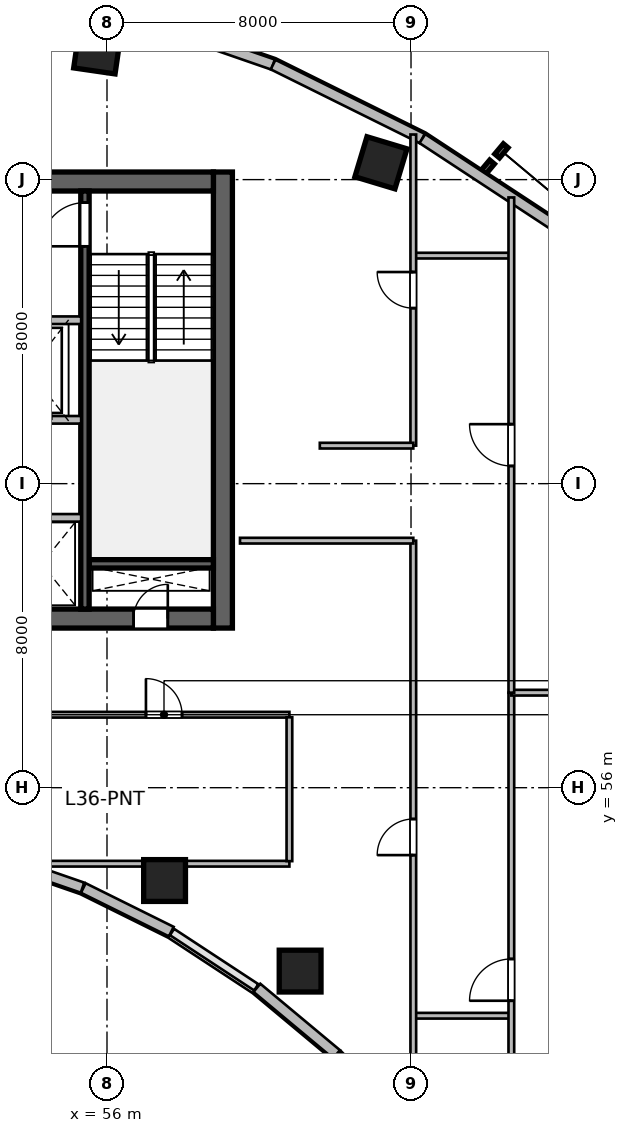
"""IFC4 building model, lengths in metres.
Left out: names, types, materials, properties, quantities, classifications, styles, units other than length and angle.
Written with IfcOpenShell. Run it as: python <this file> out.ifc"""

import sys

from ifc_helpers import new_model, si_unit, direction, frame, frame_2d, origin, origin_2d, place, context, subcontext, project, spatial, rectangle, circle, extrude, source, transform, mapped, element, fill, save


model = new_model("IFC4")
c1 = context("Model", 3, precision=1e-05, world=origin(), true_north=direction((0.0, 1.0)))
c2 = subcontext(c1, "Body", "Model", "MODEL_VIEW")
j1 = project(units=[si_unit("LENGTHUNIT", "METRE"), si_unit("PLANEANGLEUNIT", "RADIAN")], contexts=[c1])
p1 = place(None, origin())
s1 = spatial("IfcSite", under=j1, at=p1, CompositionType="ELEMENT")
p2 = place(p1, origin())
s2 = spatial("IfcBuilding", under=s1, at=p2, CompositionType="ELEMENT")
p3 = place(p2, frame((0.0, 0.0, 150.6)))
s3 = spatial("IfcBuildingStorey", under=s2, at=p3, CompositionType="ELEMENT", Elevation=150.6)
m1 = source(origin(), c2, "Body", "SweptSolid", [
    extrude(rectangle(XDim=12.0, YDim=0.5, at=frame_2d((6.0, 0.0))), origin(), (0.0, 0.0, 1.0), 3.9),
])
p4 = place(p3, frame((59.05, 60.2, 0.0), z_axis=(0.0, 0.0, 1.0), x_axis=(0.0, 1.0, 0.0)))
e1 = element("IfcWall", 1, at=p4, inside=s3, PredefinedType="SHEAR", context=c2, shape_type="MappedRepresentation", body=[
    mapped(m1, transform((0.0, 0.0, 0.0), scale=1.0)),
])
m2 = source(origin(), c2, "Body", "SweptSolid", [
    extrude(rectangle(XDim=21.6, YDim=0.5, at=frame_2d((10.8, 0.0))), origin(), (0.0, 0.0, 1.0), 3.9),
])
p5 = place(p3, frame((37.2, 60.45, 0.0), z_axis=(0.0, 0.0, 1.0), x_axis=(1.0, 0.0, 0.0)))
e2 = element("IfcWall", 2, at=p5, inside=s3, PredefinedType="SHEAR", context=c2, shape_type="MappedRepresentation", body=[
    mapped(m2, transform((0.0, 0.0, 0.0), scale=1.0)),
])
p6 = place(p5, frame((1.1, 0.0, 0.0)))
e3 = element("IfcOpeningElement", 3, at=p6, cuts=e2, PredefinedType="OPENING", context=c2, shape_type="SweptSolid", body=[
    extrude(rectangle(XDim=1.15, YDim=2.15, at=frame_2d((0.575, 1.075))), frame((0.0, 0.26, 0.0), z_axis=(0.0, -1.0, 0.0), x_axis=(1.0, 0.0, 0.0)), (0.0, 0.0, 1.0), 0.52),
])
p7 = place(p5, frame((19.5, 0.0, 0.0)))
e4 = element("IfcOpeningElement", 4, at=p7, cuts=e2, PredefinedType="OPENING", context=c2, shape_type="SweptSolid", body=[
    extrude(rectangle(XDim=0.9, YDim=2.1, at=frame_2d((0.45, 1.05))), frame((0.0, 0.26, 0.0), z_axis=(0.0, -1.0, 0.0), x_axis=(1.0, 0.0, 0.0)), (0.0, 0.0, 1.0), 0.52),
])
p8 = place(p5, frame((12.02, 0.0, 0.0)))
e5 = element("IfcOpeningElement", 5, at=p8, cuts=e2, PredefinedType="OPENING", context=c2, shape_type="SweptSolid", body=[
    extrude(rectangle(XDim=1.6, YDim=2.15, at=frame_2d((0.8, 1.075))), frame((0.0, 0.26, 0.0), z_axis=(0.0, -1.0, 0.0), x_axis=(1.0, 0.0, 0.0)), (0.0, 0.0, 1.0), 0.52),
])
p9 = place(p3, frame((37.2, 71.95, 0.0), z_axis=(0.0, 0.0, 1.0), x_axis=(1.0, 0.0, 0.0)))
e6 = element("IfcWall", 6, at=p9, inside=s3, PredefinedType="SHEAR", context=c2, shape_type="MappedRepresentation", body=[
    mapped(m2, transform((0.0, 0.0, 0.0), scale=1.0)),
])
p10 = place(p9, frame((1.2, 0.0, 0.0)))
e7 = element("IfcOpeningElement", 7, at=p10, cuts=e6, PredefinedType="OPENING", context=c2, shape_type="SweptSolid", body=[
    extrude(rectangle(XDim=0.9, YDim=2.1, at=frame_2d((0.45, 1.05))), frame((0.0, 0.26, 0.0), z_axis=(0.0, -1.0, 0.0), x_axis=(1.0, 0.0, 0.0)), (0.0, 0.0, 1.0), 0.52),
])
p11 = place(p9, frame((14.7, 0.0, 0.0)))
e8 = element("IfcOpeningElement", 8, at=p11, cuts=e6, PredefinedType="OPENING", context=c2, shape_type="SweptSolid", body=[
    extrude(rectangle(XDim=1.2, YDim=2.15, at=frame_2d((0.6, 1.075))), frame((0.0, 0.26, 0.0), z_axis=(0.0, -1.0, 0.0), x_axis=(1.0, 0.0, 0.0)), (0.0, 0.0, 1.0), 0.52),
])
p12 = place(p9, frame((4.15, 0.0, 0.0)))
e9 = element("IfcOpeningElement", 9, at=p12, cuts=e6, PredefinedType="OPENING", context=c2, shape_type="SweptSolid", body=[
    extrude(rectangle(XDim=1.3, YDim=2.15, at=frame_2d((0.65, 1.075))), frame((0.0, 0.26, 0.0), z_axis=(0.0, -1.0, 0.0), x_axis=(1.0, 0.0, 0.0)), (0.0, 0.0, 1.0), 0.52),
])
p13 = place(p9, frame((7.25, 0.0, 0.0)))
e10 = element("IfcOpeningElement", 10, at=p13, cuts=e6, PredefinedType="OPENING", context=c2, shape_type="SweptSolid", body=[
    extrude(rectangle(XDim=0.9, YDim=2.1, at=frame_2d((0.45, 1.05))), frame((0.0, 0.26, 0.0), z_axis=(0.0, -1.0, 0.0), x_axis=(1.0, 0.0, 0.0)), (0.0, 0.0, 1.0), 0.52),
])
m3 = source(origin(), c2, "Body", "SweptSolid", [
    extrude(rectangle(XDim=3.27, YDim=0.22, at=frame_2d((1.635, 0.0))), origin(), (0.0, 0.0, 1.0), 3.9),
])
p14 = place(p3, frame((55.53, 61.89, 0.0), z_axis=(0.0, 0.0, 1.0), x_axis=(1.0, 0.0, 0.0)))
e11 = element("IfcWall", 11, at=p14, inside=s3, PredefinedType="SHEAR", context=c2, shape_type="MappedRepresentation", body=[
    mapped(m3, transform((0.0, 0.0, 0.0), scale=1.0)),
])
m4 = source(origin(), c2, "Body", "SweptSolid", [
    extrude(rectangle(XDim=11.0, YDim=0.22, at=frame_2d((5.5, 0.0))), origin(), (0.0, 0.0, 1.0), 3.9),
])
p15 = place(p3, frame((55.42, 60.7, 0.0), z_axis=(0.0, 0.0, 1.0), x_axis=(0.0, 1.0, 0.0)))
e12 = element("IfcWall", 12, at=p15, inside=s3, PredefinedType="SHEAR", context=c2, shape_type="MappedRepresentation", body=[
    mapped(m4, transform((0.0, 0.0, 0.0), scale=1.0)),
])
p16 = place(p15, frame((9.545, 0.0, 0.0)))
e13 = element("IfcOpeningElement", 13, at=p16, cuts=e12, PredefinedType="OPENING", context=c2, shape_type="SweptSolid", body=[
    extrude(rectangle(XDim=1.15, YDim=2.15, at=frame_2d((0.575, 1.075))), frame((0.0, 0.12, 0.0), z_axis=(0.0, -1.0, 0.0), x_axis=(1.0, 0.0, 0.0)), (0.0, 0.0, 1.0), 0.24),
])
m5 = source(origin(), c2, "Body", "SweptSolid", [
    extrude(rectangle(XDim=1.1, YDim=1.1, at=origin_2d()), origin(), (0.0, 0.0, 1.0), 3.9),
])
p17 = place(p3, frame((55.747, 75.404, 0.0), z_axis=(0.0, 0.0, 1.0), x_axis=(0.143492621991, 0.98965138682, 0.0)))
e14 = element("IfcColumn", 14, at=p17, inside=s3, PredefinedType="COLUMN", context=c2, shape_type="MappedRepresentation", body=[
    mapped(m5, transform((0.0, 0.0, 0.0), scale=1.0)),
])
m6 = source(origin(), c2, "Body", "SweptSolid", [
    extrude(circle(Radius=0.55, at=origin_2d()), origin(), (0.0, 0.0, 1.0), 3.9),
])
p18 = place(p3, frame((57.515, 53.558, 0.0), z_axis=(0.0, 0.0, 1.0), x_axis=(0.288697611798, 0.957420330337, 0.0)))
e15 = element("IfcColumn", 15, at=p18, inside=s3, PredefinedType="COLUMN", context=c2, shape_type="MappedRepresentation", body=[
    mapped(m6, transform((0.0, 0.0, 0.0), scale=1.0)),
])
p19 = place(p3, frame((63.209, 72.442, 0.0), z_axis=(0.0, 0.0, 1.0), x_axis=(0.288697611798, 0.957420330337, 0.0)))
e16 = element("IfcColumn", 16, at=p19, inside=s3, PredefinedType="COLUMN", context=c2, shape_type="MappedRepresentation", body=[
    mapped(m5, transform((0.0, 0.0, 0.0), scale=1.0)),
])
p20 = place(p3, frame((61.082, 51.175, 0.0), z_axis=(0.0, 0.0, 1.0), x_axis=(0.409126902895, 0.912477494148, 0.0)))
e17 = element("IfcColumn", 17, at=p20, inside=s3, PredefinedType="COLUMN", context=c2, shape_type="MappedRepresentation", body=[
    mapped(m6, transform((0.0, 0.0, 0.0), scale=1.0)),
])
m7 = source(origin(), c2, "Body", "SweptSolid", [
    extrude(rectangle(XDim=2.812, YDim=0.28, at=frame_2d((1.406, 0.0))), origin(), (0.0, 0.0, 1.0), 3.65),
])
p21 = place(p3, frame((64.008, 46.95, 0.0), z_axis=(0.0, 0.0, 1.0), x_axis=(-0.694583668785, 0.719411931411, 0.0)))
e18 = element("IfcWall", 18, at=p21, inside=s3, PredefinedType="SOLIDWALL", context=c2, shape_type="MappedRepresentation", body=[
    mapped(m7, transform((0.0, 0.0, 0.0), scale=1.0)),
])
m8 = source(origin(), c2, "Body", "SweptSolid", [
    extrude(rectangle(XDim=2.729, YDim=0.28, at=frame_2d((1.365, 0.0))), origin(), (0.0, 0.0, 1.0), 3.65),
])
p22 = place(p3, frame((62.041, 48.987, 0.0), z_axis=(0.0, 0.0, 1.0), x_axis=(-0.767957284255, 0.640501061326, 0.0)))
e19 = element("IfcWall", 19, at=p22, inside=s3, PredefinedType="SOLIDWALL", context=c2, shape_type="MappedRepresentation", body=[
    mapped(m8, transform((0.0, 0.0, 0.0), scale=1.0)),
])
m9 = source(origin(), c2, "Body", "SweptSolid", [
    extrude(rectangle(XDim=2.584, YDim=0.28, at=frame_2d((1.292, 0.0))), origin(), (0.0, 0.0, 1.0), 3.65),
])
p23 = place(p3, frame((57.692, 52.213, 0.0), z_axis=(0.0, 0.0, 1.0), x_axis=(-0.895989792847, 0.44407464588, 0.0)))
e20 = element("IfcWall", 20, at=p23, inside=s3, PredefinedType="SOLIDWALL", context=c2, shape_type="MappedRepresentation", body=[
    mapped(m9, transform((0.0, 0.0, 0.0), scale=1.0)),
])
m10 = source(origin(), c2, "Body", "SweptSolid", [
    extrude(rectangle(XDim=2.53, YDim=0.28, at=frame_2d((1.265, 0.0))), origin(), (0.0, 0.0, 1.0), 3.65),
])
p24 = place(p3, frame((55.355, 53.37, 0.0), z_axis=(0.0, 0.0, 1.0), x_axis=(-0.944872429646, 0.327438683872, 0.0)))
e21 = element("IfcWall", 21, at=p24, inside=s3, PredefinedType="SOLIDWALL", context=c2, shape_type="MappedRepresentation", body=[
    mapped(m10, transform((0.0, 0.0, 0.0), scale=1.0)),
])
m11 = source(origin(), c2, "Body", "SweptSolid", [
    extrude(rectangle(XDim=4.29, YDim=0.28, at=frame_2d((2.145, 0.0))), origin(), (0.0, 0.0, 1.0), 3.65),
])
p25 = place(p3, frame((56.317, 76.431, 0.0), z_axis=(0.0, 0.0, 1.0), x_axis=(0.944883859218, -0.3274057003, 0.0)))
e22 = element("IfcWall", 22, at=p25, inside=s3, PredefinedType="SOLIDWALL", context=c2, shape_type="MappedRepresentation", body=[
    mapped(m11, transform((0.0, 0.0, 0.0), scale=1.0)),
])
m12 = source(origin(), c2, "Body", "SweptSolid", [
    extrude(rectangle(XDim=4.384, YDim=0.28, at=frame_2d((2.192, 0.0))), origin(), (0.0, 0.0, 1.0), 3.65),
])
p26 = place(p3, frame((60.37, 75.027, 0.0), z_axis=(0.0, 0.0, 1.0), x_axis=(0.895969968053, -0.444114643248, 0.0)))
e23 = element("IfcWall", 23, at=p26, inside=s3, PredefinedType="SOLIDWALL", context=c2, shape_type="MappedRepresentation", body=[
    mapped(m12, transform((0.0, 0.0, 0.0), scale=1.0)),
])
m13 = source(origin(), c2, "Body", "SweptSolid", [
    extrude(rectangle(XDim=4.501, YDim=0.28, at=frame_2d((2.25, 0.0))), origin(), (0.0, 0.0, 1.0), 3.65),
])
p27 = place(p3, frame((64.298, 73.08, 0.0), z_axis=(0.0, 0.0, 1.0), x_axis=(0.835984920737, -0.548752414391, 0.0)))
e24 = element("IfcWall", 24, at=p27, inside=s3, PredefinedType="SOLIDWALL", context=c2, shape_type="MappedRepresentation", body=[
    mapped(m13, transform((0.0, 0.0, 0.0), scale=1.0)),
])
m14 = source(origin(), c2, "Body", "SweptSolid", [
    extrude(rectangle(XDim=5.62, YDim=0.2, at=frame_2d((2.81, 0.0))), origin(), (0.0, 0.0, 1.0), 3.65),
])
p28 = place(p3, frame((49.7, 68.3, 0.0), z_axis=(0.0, 0.0, 1.0), x_axis=(1.0, 0.0, 0.0)))
e25 = element("IfcWall", 25, at=p28, inside=s3, PredefinedType="SOLIDWALL", context=c2, shape_type="MappedRepresentation", body=[
    mapped(m14, transform((0.0, 0.0, 0.0), scale=1.0)),
])
p29 = place(p28, frame((1.6, 0.0, 0.0)))
e26 = element("IfcOpeningElement", 26, at=p29, cuts=e25, PredefinedType="OPENING", context=c2, shape_type="SweptSolid", body=[
    extrude(rectangle(XDim=1.1, YDim=2.15, at=frame_2d((0.55, 1.075))), frame((0.0, 0.11, 0.0), z_axis=(0.0, -1.0, 0.0), x_axis=(1.0, 0.0, 0.0)), (0.0, 0.0, 1.0), 0.22),
])
p30 = place(p28, frame((3.7, 0.0, 0.0)))
e27 = element("IfcOpeningElement", 27, at=p30, cuts=e25, PredefinedType="OPENING", context=c2, shape_type="SweptSolid", body=[
    extrude(rectangle(XDim=1.1, YDim=2.15, at=frame_2d((0.55, 1.075))), frame((0.0, 0.11, 0.0), z_axis=(0.0, -1.0, 0.0), x_axis=(1.0, 0.0, 0.0)), (0.0, 0.0, 1.0), 0.22),
])
p31 = place(p3, frame((49.7, 65.68, 0.0), z_axis=(0.0, 0.0, 1.0), x_axis=(1.0, 0.0, 0.0)))
e28 = element("IfcWall", 28, at=p31, inside=s3, PredefinedType="SOLIDWALL", context=c2, shape_type="MappedRepresentation", body=[
    mapped(m14, transform((0.0, 0.0, 0.0), scale=1.0)),
])
m15 = source(origin(), c2, "Body", "SweptSolid", [
    extrude(rectangle(XDim=4.1, YDim=0.2, at=frame_2d((2.05, 0.0))), origin(), (0.0, 0.0, 1.0), 3.65),
])
p32 = place(p3, frame((51.22, 63.1, 0.0), z_axis=(0.0, 0.0, 1.0), x_axis=(1.0, 0.0, 0.0)))
e29 = element("IfcWall", 29, at=p32, inside=s3, PredefinedType="SOLIDWALL", context=c2, shape_type="MappedRepresentation", body=[
    mapped(m15, transform((0.0, 0.0, 0.0), scale=1.0)),
])
m16 = source(origin(), c2, "Body", "SweptSolid", [
    extrude(rectangle(XDim=6.6, YDim=0.15, at=frame_2d((3.3, 0.0))), origin(), (0.0, 0.0, 1.0), 3.095),
])
p33 = place(p3, frame((54.2, 54.0, 0.0), z_axis=(0.0, 0.0, 1.0), x_axis=(1.0, 0.0, 0.0)))
e30 = element("IfcWall", 30, at=p33, inside=s3, PredefinedType="PARTITIONING", context=c2, shape_type="MappedRepresentation", body=[
    mapped(m16, transform((0.0, 0.0, 0.0), scale=1.0)),
])
m17 = source(origin(), c2, "Body", "SweptSolid", [
    extrude(rectangle(XDim=6.6, YDim=0.15, at=frame_2d((3.3, 0.0))), origin(), (0.0, 0.0, 1.0), 3.65),
])
p34 = place(p3, frame((54.2, 57.92, 0.0), z_axis=(0.0, 0.0, 1.0), x_axis=(1.0, 0.0, 0.0)))
e31 = element("IfcWall", 31, at=p34, inside=s3, PredefinedType="PARTITIONING", context=c2, shape_type="MappedRepresentation", body=[
    mapped(m17, transform((0.0, 0.0, 0.0), scale=1.0)),
])
p35 = place(p34, frame((2.825, 0.0, 0.0)))
e32 = element("IfcOpeningElement", 32, at=p35, cuts=e31, PredefinedType="OPENING", context=c2, shape_type="SweptSolid", body=[
    extrude(rectangle(XDim=0.95, YDim=2.1, at=frame_2d((0.475, 1.05))), frame((0.0, 0.085, 0.0), z_axis=(0.0, -1.0, 0.0), x_axis=(1.0, 0.0, 0.0)), (0.0, 0.0, 1.0), 0.17),
])
m18 = source(origin(), c2, "Body", "SweptSolid", [
    extrude(rectangle(XDim=3.785, YDim=0.15, at=frame_2d((1.893, 0.0))), origin(), (0.0, 0.0, 1.0), 3.65),
])
p36 = place(p3, frame((60.8, 54.067, 0.0), z_axis=(0.0, 0.0, 1.0), x_axis=(0.0, 1.0, 0.0)))
e33 = element("IfcWall", 33, at=p36, inside=s3, PredefinedType="PARTITIONING", context=c2, shape_type="MappedRepresentation", body=[
    mapped(m18, transform((0.0, 0.0, 0.0), scale=1.0)),
])
m19 = source(origin(), c2, "Body", "SweptSolid", [
    extrude(rectangle(XDim=2.5, YDim=0.15, at=frame_2d((1.25, 0.0))), origin(), (0.0, 0.0, 1.0), 3.65),
])
for number, where, z_axis, x_axis in (
    (34, (64.1, 50.0, 0.0), (0.0, 0.0, 1.0), (1.0, 0.0, 0.0)),
    (35, (64.1, 70.0, 0.0), (0.0, 0.0, 1.0), (1.0, 0.0, 0.0)),
):
    element("IfcWall", number, at=place(p3, frame(where, z_axis=z_axis, x_axis=x_axis)), inside=s3, PredefinedType="PARTITIONING", context=c2, shape_type="MappedRepresentation", body=[
        mapped(m19, transform((0.0, 0.0, 0.0), scale=1.0)),
    ])
m20 = source(origin(), c2, "Body", "SweptSolid", [
    extrude(rectangle(XDim=15.112, YDim=0.15, at=frame_2d((7.556, 0.0))), origin(), (0.0, 0.0, 1.0), 2.942),
])
p37 = place(p3, frame((66.64, 43.388, 0.0), z_axis=(0.0, 0.0, 1.0), x_axis=(0.0, 1.0, 0.0)))
e36 = element("IfcWall", 36, at=p37, inside=s3, PredefinedType="PARTITIONING", context=c2, shape_type="MappedRepresentation", body=[
    mapped(m20, transform((0.0, 0.0, 0.0), scale=1.0)),
])
p38 = place(p37, frame((7.006, 0.0, 0.0)))
e37 = element("IfcOpeningElement", 37, at=p38, cuts=e36, PredefinedType="OPENING", context=c2, shape_type="SweptSolid", body=[
    extrude(rectangle(XDim=1.1, YDim=2.15, at=frame_2d((0.55, 1.075))), frame((0.0, 0.085, 0.0), z_axis=(0.0, -1.0, 0.0), x_axis=(1.0, 0.0, 0.0)), (0.0, 0.0, 1.0), 0.17),
])
m21 = source(origin(), c2, "Body", "SweptSolid", [
    extrude(rectangle(XDim=12.507, YDim=0.15, at=frame_2d((6.253, 0.0))), origin(), (0.0, 0.0, 1.0), 3.65),
])
p39 = place(p3, frame((66.64, 58.5, 0.0), z_axis=(0.0, 0.0, 1.0), x_axis=(1.0, 0.0, 0.0)))
e38 = element("IfcWall", 38, at=p39, inside=s3, PredefinedType="PARTITIONING", context=c2, shape_type="MappedRepresentation", body=[
    mapped(m21, transform((0.0, 0.0, 0.0), scale=1.0)),
])
m22 = source(origin(), c2, "Body", "SweptSolid", [
    extrude(rectangle(XDim=13.031, YDim=0.15, at=frame_2d((6.515, 0.0))), origin(), (0.0, 0.0, 1.0), 2.942),
])
p40 = place(p3, frame((66.64, 58.5, 0.0), z_axis=(0.0, 0.0, 1.0), x_axis=(0.0, 1.0, 0.0)))
e39 = element("IfcWall", 39, at=p40, inside=s3, PredefinedType="PARTITIONING", context=c2, shape_type="MappedRepresentation", body=[
    mapped(m22, transform((0.0, 0.0, 0.0), scale=1.0)),
])
p41 = place(p40, frame((5.965, 0.0, 0.0)))
e40 = element("IfcOpeningElement", 40, at=p41, cuts=e39, PredefinedType="OPENING", context=c2, shape_type="SweptSolid", body=[
    extrude(rectangle(XDim=1.1, YDim=2.15, at=frame_2d((0.55, 1.075))), frame((0.0, 0.085, 0.0), z_axis=(0.0, -1.0, 0.0), x_axis=(1.0, 0.0, 0.0)), (0.0, 0.0, 1.0), 0.17),
])
m23 = source(origin(), c2, "Body", "SweptSolid", [
    extrude(rectangle(XDim=15.598, YDim=0.15, at=frame_2d((7.799, 0.0))), origin(), (0.0, 0.0, 1.0), 2.942),
])
p42 = place(p3, frame((64.06, 46.902, 0.0), z_axis=(0.0, 0.0, 1.0), x_axis=(0.0, 1.0, 0.0)))
e41 = element("IfcWall", 41, at=p42, inside=s3, PredefinedType="PARTITIONING", context=c2, shape_type="MappedRepresentation", body=[
    mapped(m23, transform((0.0, 0.0, 0.0), scale=1.0)),
])
p43 = place(p42, frame((7.324, 0.0, 0.0)))
e42 = element("IfcOpeningElement", 42, at=p43, cuts=e41, PredefinedType="OPENING", context=c2, shape_type="SweptSolid", body=[
    extrude(rectangle(XDim=0.95, YDim=2.1, at=frame_2d((0.475, 1.05))), frame((0.0, 0.085, 0.0), z_axis=(0.0, -1.0, 0.0), x_axis=(1.0, 0.0, 0.0)), (0.0, 0.0, 1.0), 0.17),
])
m24 = source(origin(), c2, "Body", "SweptSolid", [
    extrude(rectangle(XDim=4.56, YDim=0.15, at=frame_2d((2.28, 0.0))), origin(), (0.0, 0.0, 1.0), 3.65),
])
p44 = place(p3, frame((59.5, 62.5, 0.0), z_axis=(0.0, 0.0, 1.0), x_axis=(1.0, 0.0, 0.0)))
e43 = element("IfcWall", 43, at=p44, inside=s3, PredefinedType="PARTITIONING", context=c2, shape_type="MappedRepresentation", body=[
    mapped(m24, transform((0.0, 0.0, 0.0), scale=1.0)),
])
m25 = source(origin(), c2, "Body", "SweptSolid", [
    extrude(rectangle(XDim=8.187, YDim=0.15, at=frame_2d((4.093, 0.0))), origin(), (0.0, 0.0, 1.0), 3.65),
])
p45 = place(p3, frame((64.06, 65.0, 0.0), z_axis=(0.0, 0.0, 1.0), x_axis=(0.0, 1.0, 0.0)))
e44 = element("IfcWall", 44, at=p45, inside=s3, PredefinedType="PARTITIONING", context=c2, shape_type="MappedRepresentation", body=[
    mapped(m25, transform((0.0, 0.0, 0.0), scale=1.0)),
])
p46 = place(p45, frame((3.618, 0.0, 0.0)))
e45 = element("IfcOpeningElement", 45, at=p46, cuts=e44, PredefinedType="OPENING", context=c2, shape_type="SweptSolid", body=[
    extrude(rectangle(XDim=0.95, YDim=2.1, at=frame_2d((0.475, 1.05))), frame((0.0, 0.085, 0.0), z_axis=(0.0, -1.0, 0.0), x_axis=(1.0, 0.0, 0.0)), (0.0, 0.0, 1.0), 0.17),
])
m26 = source(origin(), c2, "Body", "SweptSolid", [
    extrude(rectangle(XDim=2.46, YDim=0.15, at=frame_2d((1.23, 0.0))), origin(), (0.0, 0.0, 1.0), 3.65),
])
p47 = place(p3, frame((61.6, 65.0, 0.0), z_axis=(0.0, 0.0, 1.0), x_axis=(1.0, 0.0, 0.0)))
e46 = element("IfcWall", 46, at=p47, inside=s3, PredefinedType="PARTITIONING", context=c2, shape_type="MappedRepresentation", body=[
    mapped(m26, transform((0.0, 0.0, 0.0), scale=1.0)),
])
m27 = source(origin(), c2, "Body", "SweptSolid", [
    extrude(rectangle(XDim=0.9, YDim=2.1, at=frame_2d((0.45, 1.05))), frame((0.0, 0.025, 0.0), z_axis=(0.0, -1.0, 0.0), x_axis=(1.0, 0.0, 0.0)), (0.0, 0.0, 1.0), 0.05),
])
p48 = place(p7, origin())
e47 = element("IfcDoor", 47, at=p48, inside=s3, OperationType="SINGLE_SWING_RIGHT", PredefinedType="DOOR", context=c2, shape_type="MappedRepresentation", body=[
    mapped(m27, transform((0.0, 0.0, 0.0), scale=1.0)),
])
fill(e4, e47)
m28 = source(origin(), c2, "Body", "SweptSolid", [
    extrude(rectangle(XDim=1.15, YDim=2.15, at=frame_2d((0.575, 1.075))), frame((0.0, 0.025, 0.0), z_axis=(0.0, -1.0, 0.0), x_axis=(1.0, 0.0, 0.0)), (0.0, 0.0, 1.0), 0.05),
])
p49 = place(p16, origin())
e48 = element("IfcDoor", 48, at=p49, inside=s3, OperationType="SINGLE_SWING_LEFT", PredefinedType="DOOR", context=c2, shape_type="MappedRepresentation", body=[
    mapped(m28, transform((0.0, 0.0, 0.0), scale=1.0)),
])
fill(e13, e48)
m29 = source(origin(), c2, "Body", "SweptSolid", [
    extrude(rectangle(XDim=0.95, YDim=2.1, at=frame_2d((0.475, 1.05))), frame((0.0, 0.025, 0.0), z_axis=(0.0, -1.0, 0.0), x_axis=(1.0, 0.0, 0.0)), (0.0, 0.0, 1.0), 0.05),
])
p50 = place(p35, origin())
e49 = element("IfcDoor", 49, at=p50, inside=s3, OperationType="SINGLE_SWING_LEFT", PredefinedType="DOOR", context=c2, shape_type="MappedRepresentation", body=[
    mapped(m29, transform((0.0, 0.0, 0.0), scale=1.0)),
])
fill(e32, e49)
m30 = source(origin(), c2, "Body", "SweptSolid", [
    extrude(rectangle(XDim=1.1, YDim=2.15, at=frame_2d((0.55, 1.075))), frame((0.0, 0.025, 0.0), z_axis=(0.0, -1.0, 0.0), x_axis=(1.0, 0.0, 0.0)), (0.0, 0.0, 1.0), 0.05),
])
p51 = place(p38, origin())
e50 = element("IfcDoor", 50, at=p51, inside=s3, OperationType="SINGLE_SWING_LEFT", PredefinedType="DOOR", context=c2, shape_type="MappedRepresentation", body=[
    mapped(m30, transform((0.0, 0.0, 0.0), scale=1.0)),
])
fill(e37, e50)
p52 = place(p41, origin())
e51 = element("IfcDoor", 51, at=p52, inside=s3, OperationType="SINGLE_SWING_RIGHT", PredefinedType="DOOR", context=c2, shape_type="MappedRepresentation", body=[
    mapped(m30, transform((0.0, 0.0, 0.0), scale=1.0)),
])
fill(e40, e51)
p53 = place(p43, origin())
e52 = element("IfcDoor", 52, at=p53, inside=s3, OperationType="SINGLE_SWING_LEFT", PredefinedType="DOOR", context=c2, shape_type="MappedRepresentation", body=[
    mapped(m29, transform((0.0, 0.0, 0.0), scale=1.0)),
])
fill(e42, e52)
p54 = place(p46, origin())
e53 = element("IfcDoor", 53, at=p54, inside=s3, OperationType="SINGLE_SWING_RIGHT", PredefinedType="DOOR", context=c2, shape_type="MappedRepresentation", body=[
    mapped(m29, transform((0.0, 0.0, 0.0), scale=1.0)),
])
fill(e45, e53)
save(model, sys.argv[1])
